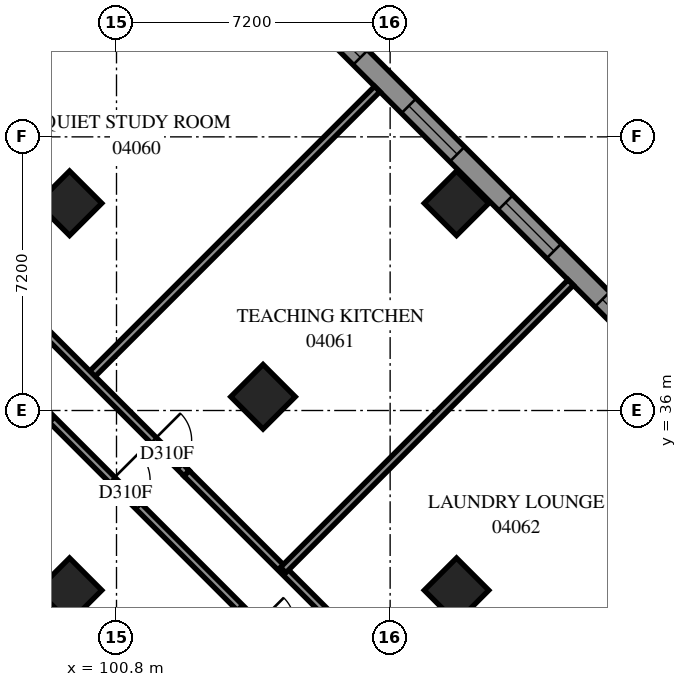
"""IFC4 building model, lengths in metres.
Left out: names, types, materials, properties, quantities, classifications, styles, units other than length and angle.
Written with IfcOpenShell. Run it as: python <this file> out.ifc"""

import sys

from ifc_helpers import new_model, si_unit, direction, frame, frame_2d, origin, origin_2d, place, context, subcontext, project, spatial, polyline, rectangle, outline, extrude, element, fill, save


model = new_model("IFC4")
c1 = context("Model", 3, precision=1e-05, world=origin(), true_north=direction((0.0, 1.0)))
c2 = subcontext(c1, "Body", "Model", "MODEL_VIEW")
j1 = project(units=[si_unit("LENGTHUNIT", "METRE"), si_unit("PLANEANGLEUNIT", "RADIAN")], contexts=[c1])
p1 = place(None, origin())
s1 = spatial("IfcSite", under=j1, at=p1, CompositionType="ELEMENT")
p2 = place(p1, origin())
s2 = spatial("IfcBuilding", under=s1, at=p2, CompositionType="ELEMENT")
p3 = place(p2, frame((0.0, 0.0, 18.6)))
s3 = spatial("IfcBuildingStorey", under=s2, at=p3, CompositionType="ELEMENT", Elevation=18.6)
for number, where, z_axis, x_axis in (
    (1, (99.565, 41.453, 0.0), (0.0, 0.0, 1.0), (0.707, -0.707, 0.0)),
    (2, (109.747, 41.453, 0.0), (0.0, 0.0, 1.0), (0.707, -0.707, 0.0)),
    (3, (104.656, 36.362, 0.0), (0.0, 0.0, 1.0), (0.707, -0.707, 0.0)),
    (4, (99.565, 31.271, 0.0), (0.0, 0.0, 1.0), (0.707, -0.707, 0.0)),
    (5, (109.747, 31.271, 0.0), (0.0, 0.0, 1.0), (0.707, -0.707, 0.0)),
):
    element("IfcColumn", number, at=place(p3, frame(where, z_axis=z_axis, x_axis=x_axis)), inside=s3, PredefinedType="COLUMN", context=c2, shape_type="SweptSolid", body=[
        extrude(rectangle(XDim=1.2, YDim=1.2, at=origin_2d()), origin(), (0.0, 0.0, 1.0), 3.8),
    ])
p4 = place(p3, frame((117.843, 34.665, 0.0), z_axis=(0.0, 0.0, 1.0), x_axis=(-0.7071067812, 0.7071067812, 0.0)))
e6 = element("IfcWall", 6, at=p4, inside=s3, PredefinedType="SOLIDWALL", context=c2, shape_type="SweptSolid", body=[
    extrude(outline(polyline([(-0.275, -0.275), (54.222, -0.275), (53.994, 0.275), (0.275, 0.275), (-0.275, -0.275)])), origin(), (0.0, 0.0, 1.0), 3.8),
])
p5 = place(p4, frame((0.8, 0.0, 0.7)))
e7 = element("IfcOpeningElement", 7, at=p5, cuts=e6, PredefinedType="OPENING", context=c2, shape_type="SweptSolid", body=[
    extrude(rectangle(XDim=1.8, YDim=2.4, at=frame_2d((0.9, 1.2))), frame((0.0, 0.285, 0.0), z_axis=(0.0, -1.0, 0.0), x_axis=(1.0, 0.0, 0.0)), (0.0, 0.0, 1.0), 0.57),
])
p6 = place(p4, frame((4.225, 0.0, 0.7)))
e8 = element("IfcOpeningElement", 8, at=p6, cuts=e6, PredefinedType="OPENING", context=c2, shape_type="SweptSolid", body=[
    extrude(rectangle(XDim=1.8, YDim=2.4, at=frame_2d((0.9, 1.2))), frame((0.0, 0.285, 0.0), z_axis=(0.0, -1.0, 0.0), x_axis=(1.0, 0.0, 0.0)), (0.0, 0.0, 1.0), 0.57),
])
p7 = place(p4, frame((7.825, 0.0, 0.7)))
e9 = element("IfcOpeningElement", 9, at=p7, cuts=e6, PredefinedType="OPENING", context=c2, shape_type="SweptSolid", body=[
    extrude(rectangle(XDim=1.8, YDim=2.4, at=frame_2d((0.9, 1.2))), frame((0.0, 0.285, 0.0), z_axis=(0.0, -1.0, 0.0), x_axis=(1.0, 0.0, 0.0)), (0.0, 0.0, 1.0), 0.57),
])
p8 = place(p4, frame((11.425, 0.0, 0.7)))
e10 = element("IfcOpeningElement", 10, at=p8, cuts=e6, PredefinedType="OPENING", context=c2, shape_type="SweptSolid", body=[
    extrude(rectangle(XDim=1.8, YDim=2.4, at=frame_2d((0.9, 1.2))), frame((0.0, 0.285, 0.0), z_axis=(0.0, -1.0, 0.0), x_axis=(1.0, 0.0, 0.0)), (0.0, 0.0, 1.0), 0.57),
])
p9 = place(p4, frame((15.025, 0.0, 0.7)))
e11 = element("IfcOpeningElement", 11, at=p9, cuts=e6, PredefinedType="OPENING", context=c2, shape_type="SweptSolid", body=[
    extrude(rectangle(XDim=1.8, YDim=2.4, at=frame_2d((0.9, 1.2))), frame((0.0, 0.285, 0.0), z_axis=(0.0, -1.0, 0.0), x_axis=(1.0, 0.0, 0.0)), (0.0, 0.0, 1.0), 0.57),
])
p10 = place(p4, frame((18.625, 0.0, 0.7)))
e12 = element("IfcOpeningElement", 12, at=p10, cuts=e6, PredefinedType="OPENING", context=c2, shape_type="SweptSolid", body=[
    extrude(rectangle(XDim=1.8, YDim=2.4, at=frame_2d((0.9, 1.2))), frame((0.0, 0.285, 0.0), z_axis=(0.0, -1.0, 0.0), x_axis=(1.0, 0.0, 0.0)), (0.0, 0.0, 1.0), 0.57),
])
p11 = place(p4, frame((22.225, 0.0, 0.7)))
e13 = element("IfcOpeningElement", 13, at=p11, cuts=e6, PredefinedType="OPENING", context=c2, shape_type="SweptSolid", body=[
    extrude(rectangle(XDim=1.8, YDim=2.4, at=frame_2d((0.9, 1.2))), frame((0.0, 0.285, 0.0), z_axis=(0.0, -1.0, 0.0), x_axis=(1.0, 0.0, 0.0)), (0.0, 0.0, 1.0), 0.57),
])
p12 = place(p4, frame((25.825, 0.0, 0.7)))
e14 = element("IfcOpeningElement", 14, at=p12, cuts=e6, PredefinedType="OPENING", context=c2, shape_type="SweptSolid", body=[
    extrude(rectangle(XDim=1.8, YDim=2.4, at=frame_2d((0.9, 1.2))), frame((0.0, 0.285, 0.0), z_axis=(0.0, -1.0, 0.0), x_axis=(1.0, 0.0, 0.0)), (0.0, 0.0, 1.0), 0.57),
])
p13 = place(p4, frame((29.425, 0.0, 0.7)))
e15 = element("IfcOpeningElement", 15, at=p13, cuts=e6, PredefinedType="OPENING", context=c2, shape_type="SweptSolid", body=[
    extrude(rectangle(XDim=1.8, YDim=2.4, at=frame_2d((0.9, 1.2))), frame((0.0, 0.285, 0.0), z_axis=(0.0, -1.0, 0.0), x_axis=(1.0, 0.0, 0.0)), (0.0, 0.0, 1.0), 0.57),
])
p14 = place(p4, frame((33.025, 0.0, 0.7)))
e16 = element("IfcOpeningElement", 16, at=p14, cuts=e6, PredefinedType="OPENING", context=c2, shape_type="SweptSolid", body=[
    extrude(rectangle(XDim=1.8, YDim=2.4, at=frame_2d((0.9, 1.2))), frame((0.0, 0.285, 0.0), z_axis=(0.0, -1.0, 0.0), x_axis=(1.0, 0.0, 0.0)), (0.0, 0.0, 1.0), 0.57),
])
p15 = place(p4, frame((36.625, 0.0, 0.7)))
e17 = element("IfcOpeningElement", 17, at=p15, cuts=e6, PredefinedType="OPENING", context=c2, shape_type="SweptSolid", body=[
    extrude(rectangle(XDim=1.8, YDim=2.4, at=frame_2d((0.9, 1.2))), frame((0.0, 0.285, 0.0), z_axis=(0.0, -1.0, 0.0), x_axis=(1.0, 0.0, 0.0)), (0.0, 0.0, 1.0), 0.57),
])
p16 = place(p4, frame((40.225, 0.0, 0.7)))
e18 = element("IfcOpeningElement", 18, at=p16, cuts=e6, PredefinedType="OPENING", context=c2, shape_type="SweptSolid", body=[
    extrude(rectangle(XDim=1.8, YDim=2.4, at=frame_2d((0.9, 1.2))), frame((0.0, 0.285, 0.0), z_axis=(0.0, -1.0, 0.0), x_axis=(1.0, 0.0, 0.0)), (0.0, 0.0, 1.0), 0.57),
])
p17 = place(p4, frame((43.825, 0.0, 0.7)))
e19 = element("IfcOpeningElement", 19, at=p17, cuts=e6, PredefinedType="OPENING", context=c2, shape_type="SweptSolid", body=[
    extrude(rectangle(XDim=1.8, YDim=2.4, at=frame_2d((0.9, 1.2))), frame((0.0, 0.285, 0.0), z_axis=(0.0, -1.0, 0.0), x_axis=(1.0, 0.0, 0.0)), (0.0, 0.0, 1.0), 0.57),
])
p18 = place(p4, frame((47.425, 0.0, 0.7)))
e20 = element("IfcOpeningElement", 20, at=p18, cuts=e6, PredefinedType="OPENING", context=c2, shape_type="SweptSolid", body=[
    extrude(rectangle(XDim=1.8, YDim=2.4, at=frame_2d((0.9, 1.2))), frame((0.0, 0.285, 0.0), z_axis=(0.0, -1.0, 0.0), x_axis=(1.0, 0.0, 0.0)), (0.0, 0.0, 1.0), 0.57),
])
p19 = place(p4, frame((51.06, 0.0, 0.7)))
e21 = element("IfcOpeningElement", 21, at=p19, cuts=e6, PredefinedType="OPENING", context=c2, shape_type="SweptSolid", body=[
    extrude(rectangle(XDim=1.8, YDim=2.4, at=frame_2d((0.9, 1.2))), frame((0.0, 0.285, 0.0), z_axis=(0.0, -1.0, 0.0), x_axis=(1.0, 0.0, 0.0)), (0.0, 0.0, 1.0), 0.57),
])
p20 = place(p3, frame((77.07, 42.275, 0.0), z_axis=(0.0, 0.0, 1.0), x_axis=(0.7071067812, -0.7071067812, 0.0)))
e22 = element("IfcWall", 22, at=p20, inside=s3, PredefinedType="SOLIDWALL", context=c2, shape_type="SweptSolid", body=[
    extrude(outline(polyline([(0.114, -0.275), (39.288, -0.275), (38.737, 0.275), (-0.114, 0.275), (0.114, -0.275)])), origin(), (0.0, 0.0, 1.0), 3.8),
])
p21 = place(p20, frame((2.837, 0.0, 0.7)))
e23 = element("IfcOpeningElement", 23, at=p21, cuts=e22, PredefinedType="OPENING", context=c2, shape_type="SweptSolid", body=[
    extrude(rectangle(XDim=1.8, YDim=2.4, at=frame_2d((0.9, 1.2))), frame((0.0, 0.285, 0.0), z_axis=(0.0, -1.0, 0.0), x_axis=(1.0, 0.0, 0.0)), (0.0, 0.0, 1.0), 0.57),
])
p22 = place(p20, frame((6.588, 0.0, 0.7)))
e24 = element("IfcOpeningElement", 24, at=p22, cuts=e22, PredefinedType="OPENING", context=c2, shape_type="SweptSolid", body=[
    extrude(rectangle(XDim=1.8, YDim=2.4, at=frame_2d((0.9, 1.2))), frame((0.0, 0.285, 0.0), z_axis=(0.0, -1.0, 0.0), x_axis=(1.0, 0.0, 0.0)), (0.0, 0.0, 1.0), 0.57),
])
p23 = place(p20, frame((10.188, 0.0, 0.7)))
e25 = element("IfcOpeningElement", 25, at=p23, cuts=e22, PredefinedType="OPENING", context=c2, shape_type="SweptSolid", body=[
    extrude(rectangle(XDim=1.8, YDim=2.4, at=frame_2d((0.9, 1.2))), frame((0.0, 0.285, 0.0), z_axis=(0.0, -1.0, 0.0), x_axis=(1.0, 0.0, 0.0)), (0.0, 0.0, 1.0), 0.57),
])
p24 = place(p20, frame((13.787, 0.0, 0.7)))
e26 = element("IfcOpeningElement", 26, at=p24, cuts=e22, PredefinedType="OPENING", context=c2, shape_type="SweptSolid", body=[
    extrude(rectangle(XDim=1.8, YDim=2.4, at=frame_2d((0.9, 1.2))), frame((0.0, 0.285, 0.0), z_axis=(0.0, -1.0, 0.0), x_axis=(1.0, 0.0, 0.0)), (0.0, 0.0, 1.0), 0.57),
])
p25 = place(p20, frame((17.387, 0.0, 0.7)))
e27 = element("IfcOpeningElement", 27, at=p25, cuts=e22, PredefinedType="OPENING", context=c2, shape_type="SweptSolid", body=[
    extrude(rectangle(XDim=1.8, YDim=2.4, at=frame_2d((0.9, 1.2))), frame((0.0, 0.285, 0.0), z_axis=(0.0, -1.0, 0.0), x_axis=(1.0, 0.0, 0.0)), (0.0, 0.0, 1.0), 0.57),
])
p26 = place(p20, frame((20.988, 0.0, 0.7)))
e28 = element("IfcOpeningElement", 28, at=p26, cuts=e22, PredefinedType="OPENING", context=c2, shape_type="SweptSolid", body=[
    extrude(rectangle(XDim=1.8, YDim=2.4, at=frame_2d((0.9, 1.2))), frame((0.0, 0.285, 0.0), z_axis=(0.0, -1.0, 0.0), x_axis=(1.0, 0.0, 0.0)), (0.0, 0.0, 1.0), 0.57),
])
p27 = place(p20, frame((24.587, 0.0, 0.7)))
e29 = element("IfcOpeningElement", 29, at=p27, cuts=e22, PredefinedType="OPENING", context=c2, shape_type="SweptSolid", body=[
    extrude(rectangle(XDim=1.8, YDim=2.4, at=frame_2d((0.9, 1.2))), frame((0.0, 0.285, 0.0), z_axis=(0.0, -1.0, 0.0), x_axis=(1.0, 0.0, 0.0)), (0.0, 0.0, 1.0), 0.57),
])
p28 = place(p20, frame((28.188, 0.0, 0.7)))
e30 = element("IfcOpeningElement", 30, at=p28, cuts=e22, PredefinedType="OPENING", context=c2, shape_type="SweptSolid", body=[
    extrude(rectangle(XDim=1.8, YDim=2.4, at=frame_2d((0.9, 1.2))), frame((0.0, 0.285, 0.0), z_axis=(0.0, -1.0, 0.0), x_axis=(1.0, 0.0, 0.0)), (0.0, 0.0, 1.0), 0.57),
])
p29 = place(p20, frame((31.788, 0.0, 0.7)))
e31 = element("IfcOpeningElement", 31, at=p29, cuts=e22, PredefinedType="OPENING", context=c2, shape_type="SweptSolid", body=[
    extrude(rectangle(XDim=1.8, YDim=2.4, at=frame_2d((0.9, 1.2))), frame((0.0, 0.285, 0.0), z_axis=(0.0, -1.0, 0.0), x_axis=(1.0, 0.0, 0.0)), (0.0, 0.0, 1.0), 0.57),
])
p30 = place(p20, frame((35.388, 0.0, 0.7)))
e32 = element("IfcOpeningElement", 32, at=p30, cuts=e22, PredefinedType="OPENING", context=c2, shape_type="SweptSolid", body=[
    extrude(rectangle(XDim=1.8, YDim=2.4, at=frame_2d((0.9, 1.2))), frame((0.0, 0.285, 0.0), z_axis=(0.0, -1.0, 0.0), x_axis=(1.0, 0.0, 0.0)), (0.0, 0.0, 1.0), 0.57),
])
p31 = place(p3, frame((93.163, 41.697, 0.0), z_axis=(0.0, 0.0, 1.0), x_axis=(0.7071067812, -0.7071067812, 0.0)))
e33 = element("IfcWall", 33, at=p31, inside=s3, PredefinedType="PARTITIONING", context=c2, shape_type="SweptSolid", body=[
    extrude(rectangle(XDim=26.299, YDim=0.2, at=frame_2d((13.149, 0.0))), origin(), (0.0, 0.0, 1.0), 3.8),
])
p32 = place(p31, frame((3.437, 0.0, 0.0)))
e34 = element("IfcOpeningElement", 34, at=p32, cuts=e33, PredefinedType="OPENING", context=c2, shape_type="SweptSolid", body=[
    extrude(rectangle(XDim=1.0, YDim=2.1, at=frame_2d((0.5, 1.05))), frame((0.0, 0.11, 0.0), z_axis=(0.0, -1.0, 0.0), x_axis=(1.0, 0.0, 0.0)), (0.0, 0.0, 1.0), 0.22),
])
p33 = place(p31, frame((10.637, 0.0, 0.0)))
e35 = element("IfcOpeningElement", 35, at=p33, cuts=e33, PredefinedType="OPENING", context=c2, shape_type="SweptSolid", body=[
    extrude(rectangle(XDim=1.0, YDim=2.1, at=frame_2d((0.5, 1.05))), frame((0.0, 0.11, 0.0), z_axis=(0.0, -1.0, 0.0), x_axis=(1.0, 0.0, 0.0)), (0.0, 0.0, 1.0), 0.22),
])
p34 = place(p31, frame((16.024, 0.0, 0.0)))
e36 = element("IfcOpeningElement", 36, at=p34, cuts=e33, PredefinedType="OPENING", context=c2, shape_type="SweptSolid", body=[
    extrude(rectangle(XDim=1.0, YDim=2.1, at=frame_2d((0.5, 1.05))), frame((0.0, 0.11, 0.0), z_axis=(0.0, -1.0, 0.0), x_axis=(1.0, 0.0, 0.0)), (0.0, 0.0, 1.0), 0.22),
])
p35 = place(p31, frame((22.657, 0.0, 0.0)))
e37 = element("IfcOpeningElement", 37, at=p35, cuts=e33, PredefinedType="OPENING", context=c2, shape_type="SweptSolid", body=[
    extrude(rectangle(XDim=1.0, YDim=2.1, at=frame_2d((0.5, 1.05))), frame((0.0, 0.11, 0.0), z_axis=(0.0, -1.0, 0.0), x_axis=(1.0, 0.0, 0.0)), (0.0, 0.0, 1.0), 0.22),
])
p36 = place(p3, frame((110.281, 26.713, 0.0), z_axis=(0.0, 0.0, 1.0), x_axis=(-0.7072363947, 0.7069771439, 0.0)))
e38 = element("IfcWall", 38, at=p36, inside=s3, PredefinedType="PARTITIONING", context=c2, shape_type="SweptSolid", body=[
    extrude(rectangle(XDim=10.8, YDim=0.2, at=frame_2d((5.4, 0.0))), origin(), (0.0, 0.0, 1.0), 3.8),
])
p37 = place(p36, frame((3.827, 0.0, 0.0)))
e39 = element("IfcOpeningElement", 39, at=p37, cuts=e38, PredefinedType="OPENING", context=c2, shape_type="SweptSolid", body=[
    extrude(rectangle(XDim=1.0, YDim=2.1, at=frame_2d((0.5, 1.05))), frame((0.0, 0.11, 0.0), z_axis=(0.0, -1.0, 0.0), x_axis=(1.0, 0.0, 0.0)), (0.0, 0.0, 1.0), 0.22),
])
for number, where, z_axis, x_axis in (
    (40, (95.003, 41.985, 0.0), (0.0, 0.0, 1.0), (0.707, 0.707, 0.0)),
    (41, (100.095, 36.893, 0.0), (0.0, 0.0, 1.0), (0.707, 0.707, 0.0)),
    (42, (105.186, 31.802, 0.0), (0.0, 0.0, 1.0), (0.707, 0.707, 0.0)),
):
    element("IfcWall", number, at=place(p3, frame(where, z_axis=z_axis, x_axis=x_axis)), inside=s3, PredefinedType="PARTITIONING", context=c2, shape_type="SweptSolid", body=[
        extrude(rectangle(XDim=10.699, YDim=0.2, at=frame_2d((5.35, 0.0))), origin(), (0.0, 0.0, 1.0), 3.8),
    ])
p38 = place(p3, frame((94.226, 42.762, 0.0), z_axis=(0.0, 0.0, 1.0), x_axis=(0.7071067812, 0.7071067812, 0.0)))
e43 = element("IfcWall", 43, at=p38, inside=s3, PredefinedType="PARTITIONING", context=c2, shape_type="SweptSolid", body=[
    extrude(rectangle(XDim=8.949, YDim=0.2, at=frame_2d((4.474, 0.0))), origin(), (0.0, 0.0, 1.0), 3.8),
])
p39 = place(p38, frame((0.149, 0.0, 0.0)))
e44 = element("IfcOpeningElement", 44, at=p39, cuts=e43, PredefinedType="OPENING", context=c2, shape_type="SweptSolid", body=[
    extrude(rectangle(XDim=1.0, YDim=2.1, at=frame_2d((0.5, 1.05))), frame((0.0, 0.11, 0.0), z_axis=(0.0, -1.0, 0.0), x_axis=(1.0, 0.0, 0.0)), (0.0, 0.0, 1.0), 0.22),
])
p40 = place(p3, frame((94.371, 42.623, 0.0), z_axis=(0.0, 0.0, 1.0), x_axis=(0.7071067812, -0.7071067812, 0.0)))
e45 = element("IfcWall", 45, at=p40, inside=s3, PredefinedType="PARTITIONING", context=c2, shape_type="SweptSolid", body=[
    extrude(outline(polyline([(0.0, -0.1), (11.7, -0.1), (11.7, 0.1), (0.0, 0.1), (0.0, -0.1)])), origin(), (0.0, 0.0, 1.0), 3.8),
])
p41 = place(p40, frame((3.274, 0.0, 0.0)))
e46 = element("IfcOpeningElement", 46, at=p41, cuts=e45, PredefinedType="OPENING", context=c2, shape_type="SweptSolid", body=[
    extrude(rectangle(XDim=1.0, YDim=2.1, at=frame_2d((0.5, 1.05))), frame((0.0, 0.11, 0.0), z_axis=(0.0, -1.0, 0.0), x_axis=(1.0, 0.0, 0.0)), (0.0, 0.0, 1.0), 0.22),
])
p42 = place(p40, frame((10.473, 0.0, 0.0)))
e47 = element("IfcOpeningElement", 47, at=p42, cuts=e45, PredefinedType="OPENING", context=c2, shape_type="SweptSolid", body=[
    extrude(rectangle(XDim=1.0, YDim=2.1, at=frame_2d((0.5, 1.05))), frame((0.0, 0.11, 0.0), z_axis=(0.0, -1.0, 0.0), x_axis=(1.0, 0.0, 0.0)), (0.0, 0.0, 1.0), 0.22),
])
p43 = place(p3, frame((110.277, 26.711, 0.0), z_axis=(0.0, 0.0, 1.0), x_axis=(0.7071067812, 0.7071067812, 0.0)))
e48 = element("IfcWall", 48, at=p43, inside=s3, PredefinedType="PARTITIONING", context=c2, shape_type="SweptSolid", body=[
    extrude(rectangle(XDim=5.899, YDim=0.2, at=frame_2d((2.95, 0.0))), origin(), (0.0, 0.0, 1.0), 3.8),
])
p44 = place(p6, origin())
e49 = element("IfcWindow", 49, at=p44, inside=s3, PartitioningType="SINGLE_PANEL", PredefinedType="WINDOW", context=c2, shape_type="SweptSolid", body=[
    extrude(rectangle(XDim=1.8, YDim=2.4, at=frame_2d((0.9, 1.2))), frame((0.0, 0.155, 0.0), z_axis=(0.0, -1.0, 0.0), x_axis=(1.0, 0.0, 0.0)), (0.0, 0.0, 1.0), 0.06),
])
fill(e8, e49)
p45 = place(p7, origin())
e50 = element("IfcWindow", 50, at=p45, inside=s3, PartitioningType="SINGLE_PANEL", PredefinedType="WINDOW", context=c2, shape_type="SweptSolid", body=[
    extrude(rectangle(XDim=1.8, YDim=2.4, at=frame_2d((0.9, 1.2))), frame((0.0, 0.155, 0.0), z_axis=(0.0, -1.0, 0.0), x_axis=(1.0, 0.0, 0.0)), (0.0, 0.0, 1.0), 0.06),
])
fill(e9, e50)
p46 = place(p8, origin())
e51 = element("IfcWindow", 51, at=p46, inside=s3, PartitioningType="SINGLE_PANEL", PredefinedType="WINDOW", context=c2, shape_type="SweptSolid", body=[
    extrude(rectangle(XDim=1.8, YDim=2.4, at=frame_2d((0.9, 1.2))), frame((0.0, 0.155, 0.0), z_axis=(0.0, -1.0, 0.0), x_axis=(1.0, 0.0, 0.0)), (0.0, 0.0, 1.0), 0.06),
])
fill(e10, e51)
p47 = place(p9, origin())
e52 = element("IfcWindow", 52, at=p47, inside=s3, PartitioningType="SINGLE_PANEL", PredefinedType="WINDOW", context=c2, shape_type="SweptSolid", body=[
    extrude(rectangle(XDim=1.8, YDim=2.4, at=frame_2d((0.9, 1.2))), frame((0.0, 0.155, 0.0), z_axis=(0.0, -1.0, 0.0), x_axis=(1.0, 0.0, 0.0)), (0.0, 0.0, 1.0), 0.06),
])
fill(e11, e52)
p48 = place(p42, origin())
e53 = element("IfcDoor", 53, at=p48, inside=s3, OperationType="SINGLE_SWING_RIGHT", PredefinedType="DOOR", context=c2, shape_type="SweptSolid", body=[
    extrude(rectangle(XDim=1.0, YDim=2.1, at=frame_2d((0.5, 1.05))), frame((0.0, 0.025, 0.0), z_axis=(0.0, -1.0, 0.0), x_axis=(1.0, 0.0, 0.0)), (0.0, 0.0, 1.0), 0.05),
])
fill(e47, e53)
p49 = place(p33, origin())
e54 = element("IfcDoor", 54, at=p49, inside=s3, OperationType="SINGLE_SWING_LEFT", PredefinedType="DOOR", context=c2, shape_type="SweptSolid", body=[
    extrude(rectangle(XDim=1.0, YDim=2.1, at=frame_2d((0.5, 1.05))), frame((0.0, 0.025, 0.0), z_axis=(0.0, -1.0, 0.0), x_axis=(1.0, 0.0, 0.0)), (0.0, 0.0, 1.0), 0.05),
])
fill(e35, e54)
save(model, sys.argv[1])
